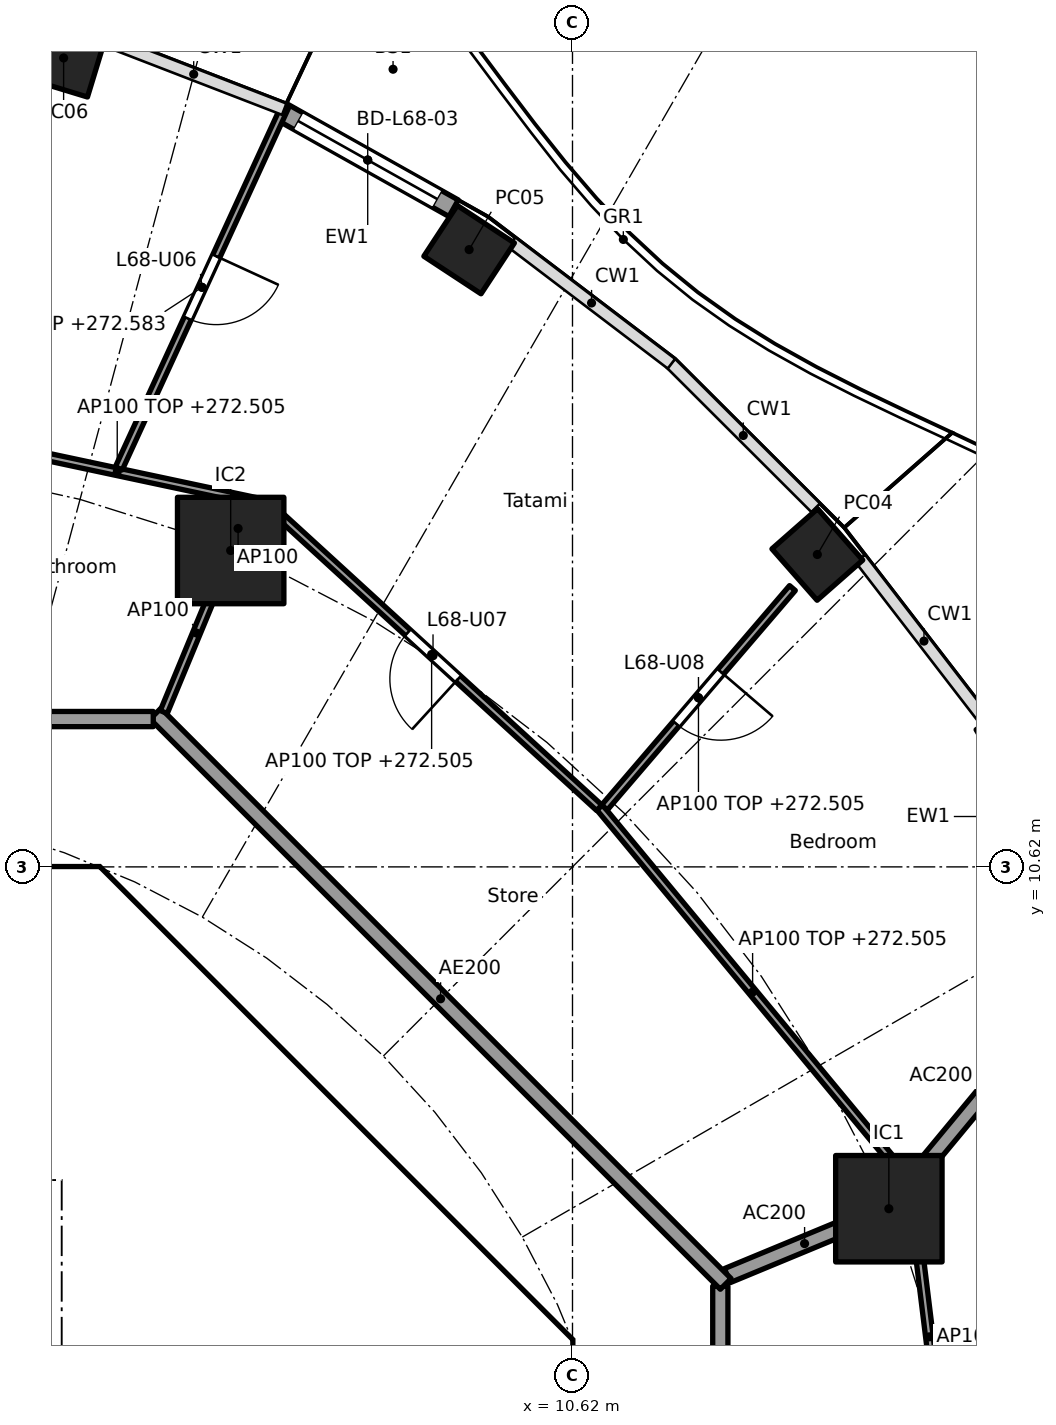
"""IFC4 building model, lengths in metres.
Left out: names, types, materials, properties, quantities, classifications, styles, units other than length and angle.
Written with IfcOpenShell. Run it as: python <this file> out.ifc"""

import sys

from ifc_helpers import new_model, si_unit, direction, frame, frame_2d, origin, origin_2d, place, context, subcontext, project, spatial, polyline, rectangle, hollow_rectangle, outline, extrude, element, fill, save


model = new_model("IFC4")
c1 = context("Model", 3, precision=1e-05, world=origin(), true_north=direction((0.0, 1.0)))
c2 = subcontext(c1, "Body", "Model", "MODEL_VIEW")
j1 = project(units=[si_unit("LENGTHUNIT", "METRE"), si_unit("PLANEANGLEUNIT", "RADIAN")], contexts=[c1])
p1 = place(None, origin())
s1 = spatial("IfcSite", under=j1, at=p1, CompositionType="ELEMENT")
p2 = place(p1, origin())
s2 = spatial("IfcBuilding", under=s1, at=p2, CompositionType="ELEMENT")
p3 = place(p2, frame((0.0, 0.0, 269.6)))
s3 = spatial("IfcBuildingStorey", under=s2, at=p3, CompositionType="ELEMENT", Elevation=269.6)
for number, where, z_axis, x_axis in (
    (1, (13.841, 14.73, 0.0), (0.0, 0.0, 1.0), (-0.66, 0.751, 0.0)),
    (2, (9.26, 18.741, 0.0), (0.0, 0.0, 1.0), (-0.836, 0.549, 0.0)),
    (3, (3.925, 21.262, 0.0), (0.0, 0.0, 1.0), (-0.957, 0.292, 0.0)),
):
    element("IfcColumn", number, at=place(p3, frame(where, z_axis=z_axis, x_axis=x_axis)), inside=s3, PredefinedType="COLUMN", context=c2, shape_type="SweptSolid", body=[
        extrude(hollow_rectangle(XDim=0.9, YDim=0.8, WallThickness=0.028, at=origin_2d()), origin(), (0.0, 0.0, 1.0), 3.7),
    ])
for number, where, z_axis, x_axis in (
    (4, (14.782, 6.123, 0.0), (0.0, 0.0, 1.0), (1.0, 0.0, 0.0)),
    (5, (6.123, 14.782, 0.0), (0.0, 0.0, 1.0), (1.0, 0.0, 0.0)),
):
    element("IfcColumn", number, at=place(p3, frame(where, z_axis=z_axis, x_axis=x_axis)), inside=s3, PredefinedType="COLUMN", context=c2, shape_type="SweptSolid", body=[
        extrude(rectangle(XDim=1.4, YDim=1.4, at=origin_2d()), origin(), (0.0, 0.0, 1.0), 3.7),
    ])
p4 = place(p3, frame((16.038, 12.489, 0.0), z_axis=(0.0, 0.0, 1.0), x_axis=(0.506371364425, -0.862315511452, 0.0)))
e6 = element("IfcWall", 6, at=p4, inside=s3, PredefinedType="SOLIDWALL", context=c2, shape_type="SweptSolid", body=[
    extrude(rectangle(XDim=2.796, YDim=0.25, at=frame_2d((1.398, 0.0))), origin(), (0.0, 0.0, 1.0), 3.44),
])
p5 = place(p4, frame((0.348, 0.0, 0.0)))
e7 = element("IfcOpeningElement", 7, at=p5, cuts=e6, PredefinedType="OPENING", context=c2, shape_type="SweptSolid", body=[
    extrude(rectangle(XDim=2.1, YDim=2.4, at=frame_2d((1.05, 1.2))), frame((0.0, 0.135, 0.0), z_axis=(0.0, -1.0, 0.0), x_axis=(1.0, 0.0, 0.0)), (0.0, 0.0, 1.0), 0.27),
])
p6 = place(p3, frame((6.795, 20.554, 0.0), z_axis=(0.0, 0.0, 1.0), x_axis=(0.872052877201, -0.489411666561, 0.0)))
e8 = element("IfcWall", 8, at=p6, inside=s3, PredefinedType="SOLIDWALL", context=c2, shape_type="SweptSolid", body=[
    extrude(rectangle(XDim=2.593, YDim=0.25, at=frame_2d((1.296, 0.0))), origin(), (0.0, 0.0, 1.0), 3.44),
])
p7 = place(p6, frame((0.247, 0.0, 0.0)))
e9 = element("IfcOpeningElement", 9, at=p7, cuts=e8, PredefinedType="OPENING", context=c2, shape_type="SweptSolid", body=[
    extrude(rectangle(XDim=2.1, YDim=2.4, at=frame_2d((1.05, 1.2))), frame((0.0, 0.135, 0.0), z_axis=(0.0, -1.0, 0.0), x_axis=(1.0, 0.0, 0.0)), (0.0, 0.0, 1.0), 0.27),
])
p8 = place(p3, frame((9.988, 4.613, 0.0), z_axis=(0.0, 0.0, 1.0), x_axis=(-0.707106781187, 0.707106781187, 0.0)))
e10 = element("IfcWall", 10, at=p8, inside=s3, PredefinedType="SHEAR", context=c2, shape_type="SweptSolid", body=[
    extrude(rectangle(XDim=7.602, YDim=0.6, at=frame_2d((3.801, 0.0))), origin(), (0.0, 0.0, 1.0), 3.44),
])
p9 = place(p8, frame((3.201, 0.0, 0.0)))
e11 = element("IfcOpeningElement", 11, at=p9, cuts=e10, PredefinedType="OPENING", context=c2, shape_type="SweptSolid", body=[
    extrude(rectangle(XDim=1.2, YDim=2.1, at=frame_2d((0.6, 1.05))), frame((0.0, 0.31, 0.0), z_axis=(0.0, -1.0, 0.0), x_axis=(1.0, 0.0, 0.0)), (0.0, 0.0, 1.0), 0.62),
])
p10 = place(p3, frame((4.0, 4.3, 0.0), z_axis=(0.0, 0.0, 1.0), x_axis=(0.0, 1.0, 0.0)))
e12 = element("IfcWall", 12, at=p10, inside=s3, PredefinedType="SOLIDWALL", context=c2, shape_type="SweptSolid", body=[
    extrude(rectangle(XDim=2.2, YDim=0.2, at=frame_2d((1.1, 0.0))), origin(), (0.0, 0.0, 1.0), 3.44),
])
p11 = place(p10, frame((0.55, 0.0, 0.0)))
e13 = element("IfcOpeningElement", 13, at=p11, cuts=e12, PredefinedType="OPENING", context=c2, shape_type="SweptSolid", body=[
    extrude(rectangle(XDim=1.1, YDim=2.1, at=frame_2d((0.55, 1.05))), frame((0.0, 0.11, 0.0), z_axis=(0.0, -1.0, 0.0), x_axis=(1.0, 0.0, 0.0)), (0.0, 0.0, 1.0), 0.22),
])
p12 = place(p3, frame((4.0, 7.025, 0.0), z_axis=(0.0, 0.0, 1.0), x_axis=(0.0, 1.0, 0.0)))
e14 = element("IfcWall", 14, at=p12, inside=s3, PredefinedType="SOLIDWALL", context=c2, shape_type="SweptSolid", body=[
    extrude(rectangle(XDim=3.0, YDim=0.2, at=frame_2d((1.5, 0.0))), origin(), (0.0, 0.0, 1.0), 3.44),
])
p13 = place(p12, frame((0.925, 0.0, 0.0)))
e15 = element("IfcOpeningElement", 15, at=p13, cuts=e14, PredefinedType="OPENING", context=c2, shape_type="SweptSolid", body=[
    extrude(rectangle(XDim=1.1, YDim=2.1, at=frame_2d((0.55, 1.05))), frame((0.0, 0.11, 0.0), z_axis=(0.0, -1.0, 0.0), x_axis=(1.0, 0.0, 0.0)), (0.0, 0.0, 1.0), 0.22),
])
p14 = place(p3, origin())
e16 = element("IfcWall", 16, at=p14, inside=s3, PredefinedType="SHEAR", context=c2, shape_type="SweptSolid", body=[
    extrude(outline(polyline([(-4.152, 10.025), (-4.401, 9.776), (-4.825, 10.2), (-4.401, 10.625), (4.401, 10.625), (4.825, 10.2), (4.401, 9.776), (4.152, 10.025), (-4.152, 10.025)])), origin(), (0.0, 0.0, 1.0), 3.44),
])
p15 = place(p3, origin())
e17 = element("IfcWall", 17, at=p15, inside=s3, PredefinedType="SHEAR", context=c2, shape_type="SweptSolid", body=[
    extrude(outline(polyline([(9.776, -4.401), (10.025, -4.152), (10.025, -3.801), (10.025, 4.152), (9.776, 4.401), (10.2, 4.825), (10.625, 4.401), (10.625, -4.401), (10.2, -4.825), (9.776, -4.401)])), origin(), (0.0, 0.0, 1.0), 3.44),
])
p16 = place(p3, origin())
e18 = element("IfcWall", 18, at=p16, inside=s3, PredefinedType="SOLIDWALL", context=c2, shape_type="SweptSolid", body=[
    extrude(outline(polyline([(4.1, 6.5), (-4.1, 6.5), (-4.1, 7.025), (4.1, 7.025), (4.1, 6.5)])), origin(), (0.0, 0.0, 1.0), 3.44),
])
p17 = place(p3, frame((12.657, 5.243, 0.0), z_axis=(0.0, 0.0, 1.0), x_axis=(0.923853160736, 0.382747093259, 0.0)))
e19 = element("IfcWall", 19, at=p17, inside=s3, PredefinedType="PARTITIONING", context=c2, shape_type="SweptSolid", body=[
    extrude(rectangle(XDim=2.2, YDim=0.2, at=frame_2d((1.1, 0.0))), origin(), (0.0, 0.0, 1.0), 3.44),
])
p18 = place(p3, frame((14.814, 6.161, 0.0), z_axis=(0.0, 0.0, 1.0), x_axis=(0.638050520313, 0.769994502272, 0.0)))
e20 = element("IfcWall", 20, at=p18, inside=s3, PredefinedType="PARTITIONING", context=c2, shape_type="SweptSolid", body=[
    extrude(rectangle(XDim=3.673, YDim=0.2, at=frame_2d((1.836, 0.0))), origin(), (0.0, 0.0, 1.0), 3.44),
])
p19 = place(p3, frame((12.565, -5.104, 0.0), z_axis=(0.0, 0.0, 1.0), x_axis=(0.0, 1.0, 0.0)))
e21 = element("IfcWall", 21, at=p19, inside=s3, PredefinedType="PARTITIONING", context=c2, shape_type="SweptSolid", body=[
    extrude(rectangle(XDim=10.209, YDim=0.2, at=frame_2d((5.104, 0.0))), origin(), (0.0, 0.0, 1.0), 3.44),
])
p20 = place(p19, frame((4.604, 0.0, 0.0)))
e22 = element("IfcOpeningElement", 22, at=p20, cuts=e21, PredefinedType="OPENING", context=c2, shape_type="SweptSolid", body=[
    extrude(rectangle(XDim=1.0, YDim=2.1, at=frame_2d((0.5, 1.05))), frame((0.0, 0.11, 0.0), z_axis=(0.0, -1.0, 0.0), x_axis=(1.0, 0.0, 0.0)), (0.0, 0.0, 1.0), 0.22),
])
p21 = place(p3, frame((12.635, 5.134, 0.0), z_axis=(0.0, 0.0, 1.0), x_axis=(-0.707106781187, 0.707106781187, 0.0)))
e23 = element("IfcWall", 23, at=p21, inside=s3, PredefinedType="PARTITIONING", context=c2, shape_type="SweptSolid", body=[
    extrude(rectangle(XDim=10.609, YDim=0.2, at=frame_2d((5.305, 0.0))), origin(), (0.0, 0.0, 1.0), 3.44),
])
p22 = place(p3, frame((5.104, 12.565, 0.0), z_axis=(0.0, 0.0, 1.0), x_axis=(-1.0, 0.0, 0.0)))
e24 = element("IfcWall", 24, at=p22, inside=s3, PredefinedType="PARTITIONING", context=c2, shape_type="SweptSolid", body=[
    extrude(rectangle(XDim=10.409, YDim=0.2, at=frame_2d((5.205, 0.0))), origin(), (0.0, 0.0, 1.0), 3.44),
])
p23 = place(p22, frame((4.604, 0.0, 0.0)))
e25 = element("IfcOpeningElement", 25, at=p23, cuts=e24, PredefinedType="OPENING", context=c2, shape_type="SweptSolid", body=[
    extrude(rectangle(XDim=1.0, YDim=2.1, at=frame_2d((0.5, 1.05))), frame((0.0, 0.11, 0.0), z_axis=(0.0, -1.0, 0.0), x_axis=(1.0, 0.0, 0.0)), (0.0, 0.0, 1.0), 0.22),
])
p24 = place(p3, frame((15.552, 2.508, 0.0), z_axis=(0.0, 0.0, 1.0), x_axis=(-0.12196293976, 0.992534654974, 0.0)))
e26 = element("IfcWall", 26, at=p24, inside=s3, PredefinedType="PARTITIONING", context=c2, shape_type="SweptSolid", body=[
    extrude(rectangle(XDim=3.887, YDim=0.1, at=frame_2d((1.944, 0.0))), origin(), (0.0, 0.0, 1.0), 2.905),
])
p25 = place(p3, frame((15.002, 6.543, 0.0), z_axis=(0.0, 0.0, 1.0), x_axis=(-0.637932656528, 0.770092154054, 0.0)))
e27 = element("IfcWall", 27, at=p25, inside=s3, PredefinedType="PARTITIONING", context=c2, shape_type="SweptSolid", body=[
    extrude(rectangle(XDim=6.311, YDim=0.1, at=frame_2d((3.155, 0.0))), origin(), (0.0, 0.0, 1.0), 2.905),
])
p26 = place(p3, frame((11.041, 11.402, 0.0), z_axis=(0.0, 0.0, 1.0), x_axis=(0.650558544325, 0.759456108282, 0.0)))
e28 = element("IfcWall", 28, at=p26, inside=s3, PredefinedType="PARTITIONING", context=c2, shape_type="SweptSolid", body=[
    extrude(rectangle(XDim=3.8, YDim=0.1, at=frame_2d((1.9, 0.0))), origin(), (0.0, 0.0, 1.0), 2.905),
])
p27 = place(p26, frame((1.45, 0.0, 0.0)))
e29 = element("IfcOpeningElement", 29, at=p27, cuts=e28, PredefinedType="OPENING", context=c2, shape_type="SweptSolid", body=[
    extrude(rectangle(XDim=0.9, YDim=2.1, at=frame_2d((0.45, 1.05))), frame((0.0, 0.06, 0.0), z_axis=(0.0, -1.0, 0.0), x_axis=(1.0, 0.0, 0.0)), (0.0, 0.0, 1.0), 0.12),
])
p28 = place(p3, frame((10.972, 11.398, 0.0), z_axis=(0.0, 0.0, 1.0), x_axis=(-0.737838738013, 0.674977034193, 0.0)))
e30 = element("IfcWall", 30, at=p28, inside=s3, PredefinedType="PARTITIONING", context=c2, shape_type="SweptSolid", body=[
    extrude(rectangle(XDim=5.977, YDim=0.1, at=frame_2d((2.989, 0.0))), origin(), (0.0, 0.0, 1.0), 2.905),
])
p29 = place(p28, frame((2.514, 0.0, 0.0)))
e31 = element("IfcOpeningElement", 31, at=p29, cuts=e30, PredefinedType="OPENING", context=c2, shape_type="SweptSolid", body=[
    extrude(rectangle(XDim=0.9, YDim=2.1, at=frame_2d((0.45, 1.05))), frame((0.0, 0.06, 0.0), z_axis=(0.0, -1.0, 0.0), x_axis=(1.0, 0.0, 0.0)), (0.0, 0.0, 1.0), 0.12),
])
p30 = place(p3, frame((5.243, 12.657, 0.0), z_axis=(0.0, 0.0, 1.0), x_axis=(0.382719158442, 0.923864733477, 0.0)))
e32 = element("IfcWall", 32, at=p30, inside=s3, PredefinedType="PARTITIONING", context=c2, shape_type="SweptSolid", body=[
    extrude(rectangle(XDim=2.25, YDim=0.1, at=frame_2d((1.125, 0.0))), origin(), (0.0, 0.0, 1.0), 3.44),
])
p31 = place(p3, frame((6.55, 15.409, 0.0), z_axis=(0.0, 0.0, 1.0), x_axis=(-0.978051195976, 0.208364723621, 0.0)))
e33 = element("IfcWall", 33, at=p31, inside=s3, PredefinedType="PARTITIONING", context=c2, shape_type="SweptSolid", body=[
    extrude(rectangle(XDim=3.924, YDim=0.1, at=frame_2d((1.962, 0.0))), origin(), (0.0, 0.0, 1.0), 2.905),
])
p32 = place(p3, frame((4.651, 15.863, 0.0), z_axis=(0.0, 0.0, 1.0), x_axis=(0.41744196735, 0.908703584176, 0.0)))
e34 = element("IfcWall", 34, at=p32, inside=s3, PredefinedType="PARTITIONING", context=c2, shape_type="SweptSolid", body=[
    extrude(rectangle(XDim=5.242, YDim=0.1, at=frame_2d((2.621, 0.0))), origin(), (0.0, 0.0, 1.0), 2.983),
])
p33 = place(p32, frame((2.171, 0.0, 0.0)))
e35 = element("IfcOpeningElement", 35, at=p33, cuts=e34, PredefinedType="OPENING", context=c2, shape_type="SweptSolid", body=[
    extrude(rectangle(XDim=0.9, YDim=2.1, at=frame_2d((0.45, 1.05))), frame((0.0, 0.06, 0.0), z_axis=(0.0, -1.0, 0.0), x_axis=(1.0, 0.0, 0.0)), (0.0, 0.0, 1.0), 0.12),
])
p34 = place(p3, frame((6.388, 15.29, 0.0), z_axis=(0.0, 0.0, 1.0), x_axis=(-0.610612392422, -0.791929609385, 0.0)))
e36 = element("IfcWall", 36, at=p34, inside=s3, PredefinedType="PARTITIONING", context=c2, shape_type="SweptSolid", body=[
    extrude(rectangle(XDim=0.549, YDim=0.1, at=frame_2d((0.275, 0.0))), origin(), (0.0, 0.0, 1.0), 3.44),
])
p35 = place(p7, origin())
e37 = element("IfcDoor", 37, at=p35, inside=s3, OperationType="SLIDING_TO_LEFT", PredefinedType="DOOR", context=c2, shape_type="SweptSolid", body=[
    extrude(rectangle(XDim=2.1, YDim=2.4, at=frame_2d((1.05, 1.2))), frame((0.0, 0.025, 0.0), z_axis=(0.0, -1.0, 0.0), x_axis=(1.0, 0.0, 0.0)), (0.0, 0.0, 1.0), 0.05),
])
fill(e9, e37)
p36 = place(p11, origin())
e38 = element("IfcDoor", 38, at=p36, inside=s3, OperationType="DOUBLE_DOOR_SLIDING", PredefinedType="DOOR", context=c2, shape_type="SweptSolid", body=[
    extrude(rectangle(XDim=1.1, YDim=2.1, at=frame_2d((0.55, 1.05))), frame((0.0, 0.025, 0.0), z_axis=(0.0, -1.0, 0.0), x_axis=(1.0, 0.0, 0.0)), (0.0, 0.0, 1.0), 0.05),
])
fill(e13, e38)
p37 = place(p13, origin())
e39 = element("IfcDoor", 39, at=p37, inside=s3, OperationType="SINGLE_SWING_RIGHT", PredefinedType="DOOR", context=c2, shape_type="SweptSolid", body=[
    extrude(rectangle(XDim=1.1, YDim=2.1, at=frame_2d((0.55, 1.05))), frame((0.0, 0.025, 0.0), z_axis=(0.0, -1.0, 0.0), x_axis=(1.0, 0.0, 0.0)), (0.0, 0.0, 1.0), 0.05),
])
fill(e15, e39)
p38 = place(p9, origin())
e40 = element("IfcDoor", 40, at=p38, inside=s3, OperationType="SINGLE_SWING_RIGHT", PredefinedType="DOOR", context=c2, shape_type="SweptSolid", body=[
    extrude(rectangle(XDim=1.2, YDim=2.1, at=frame_2d((0.6, 1.05))), frame((0.0, 0.025, 0.0), z_axis=(0.0, -1.0, 0.0), x_axis=(1.0, 0.0, 0.0)), (0.0, 0.0, 1.0), 0.05),
])
fill(e11, e40)
p39 = place(p33, frame((0.9, 0.0, 0.0), x_axis=(-1.0, 0.0, 0.0)))
e41 = element("IfcDoor", 41, at=p39, inside=s3, OperationType="SINGLE_SWING_LEFT", PredefinedType="DOOR", context=c2, shape_type="SweptSolid", body=[
    extrude(rectangle(XDim=0.9, YDim=2.1, at=frame_2d((0.45, 1.05))), frame((0.0, 0.025, 0.0), z_axis=(0.0, -1.0, 0.0), x_axis=(1.0, 0.0, 0.0)), (0.0, 0.0, 1.0), 0.05),
])
fill(e35, e41)
p40 = place(p29, origin())
e42 = element("IfcDoor", 42, at=p40, inside=s3, OperationType="SINGLE_SWING_LEFT", PredefinedType="DOOR", context=c2, shape_type="SweptSolid", body=[
    extrude(rectangle(XDim=0.9, YDim=2.1, at=frame_2d((0.45, 1.05))), frame((0.0, 0.025, 0.0), z_axis=(0.0, -1.0, 0.0), x_axis=(1.0, 0.0, 0.0)), (0.0, 0.0, 1.0), 0.05),
])
fill(e31, e42)
p41 = place(p27, frame((0.9, 0.0, 0.0), x_axis=(-1.0, 0.0, 0.0)))
e43 = element("IfcDoor", 43, at=p41, inside=s3, OperationType="SINGLE_SWING_LEFT", PredefinedType="DOOR", context=c2, shape_type="SweptSolid", body=[
    extrude(rectangle(XDim=0.9, YDim=2.1, at=frame_2d((0.45, 1.05))), frame((0.0, 0.025, 0.0), z_axis=(0.0, -1.0, 0.0), x_axis=(1.0, 0.0, 0.0)), (0.0, 0.0, 1.0), 0.05),
])
fill(e29, e43)
save(model, sys.argv[1])
